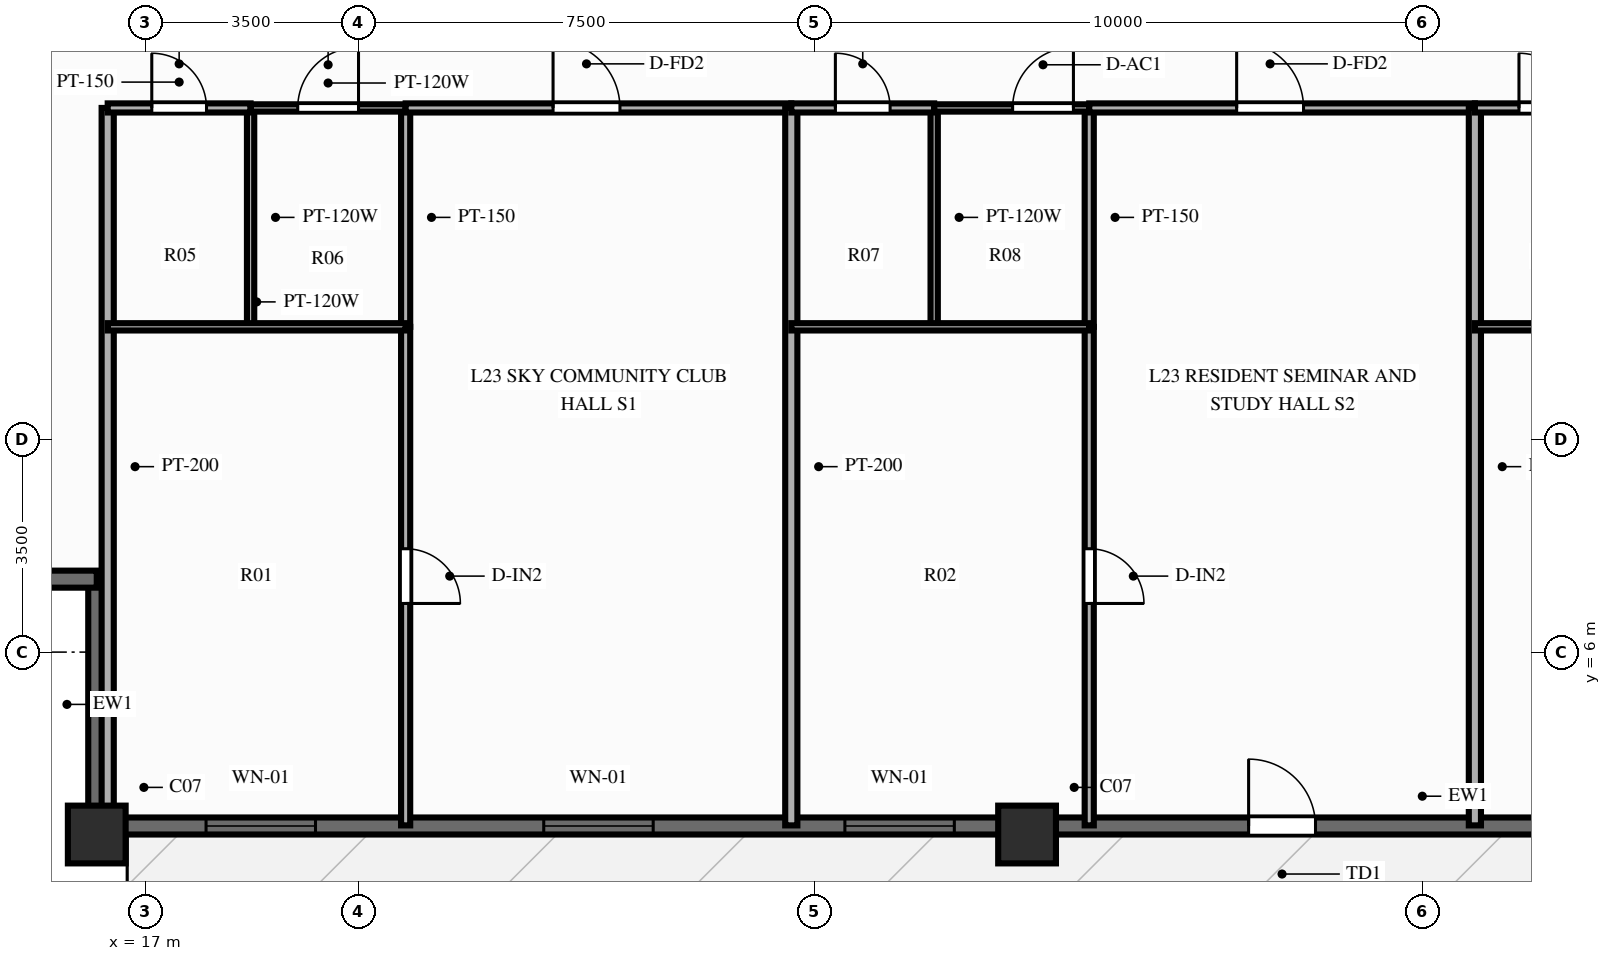
"""IFC4 building model, lengths in metres.
Left out: names, types, materials, properties, quantities, classifications, styles, units other than length and angle.
Written with IfcOpenShell. Run it as: python <this file> out.ifc"""

import sys

from ifc_helpers import new_model, si_unit, direction, frame, frame_2d, origin, origin_2d, place, context, subcontext, project, spatial, rectangle, extrude, source, transform, mapped, element, fill, save


model = new_model("IFC4")
c1 = context("Model", 3, precision=1e-05, world=origin(), true_north=direction((0.0, 1.0)))
c2 = subcontext(c1, "Body", "Model", "MODEL_VIEW")
j1 = project(units=[si_unit("LENGTHUNIT", "METRE"), si_unit("PLANEANGLEUNIT", "RADIAN")], contexts=[c1])
p1 = place(None, origin())
s1 = spatial("IfcSite", under=j1, at=p1, CompositionType="ELEMENT")
p2 = place(p1, origin())
s2 = spatial("IfcBuilding", under=s1, at=p2, CompositionType="ELEMENT")
p3 = place(p2, frame((0.0, 0.0, 74.35)))
s3 = spatial("IfcBuildingStorey", under=s2, at=p3, CompositionType="ELEMENT", Elevation=74.35)
m1 = source(origin(), c2, "Body", "SweptSolid", [
    extrude(rectangle(XDim=0.95, YDim=0.95, at=origin_2d()), origin(), (0.0, 0.0, 1.0), 3.5),
])
for number, where, z_axis, x_axis in (
    (1, (16.2, 3.0, 0.0), (0.0, 0.0, 1.0), (1.0, 0.0, 0.0)),
    (2, (31.5, 3.0, 0.0), (0.0, 0.0, 1.0), (1.0, 0.0, 0.0)),
):
    element("IfcColumn", number, at=place(p3, frame(where, z_axis=z_axis, x_axis=x_axis)), inside=s3, PredefinedType="COLUMN", context=c2, shape_type="MappedRepresentation", body=[
        mapped(m1, transform((0.0, 0.0, 0.0), scale=1.0)),
    ])
p4 = place(p3, frame((16.2, 3.14, 0.0), z_axis=(0.0, 0.0, 1.0), x_axis=(1.0, 0.0, 0.0)))
e3 = element("IfcWall", 3, at=p4, inside=s3, PredefinedType="SOLIDWALL", context=c2, shape_type="SweptSolid", body=[
    extrude(rectangle(XDim=43.6, YDim=0.28, at=frame_2d((21.8, 0.0))), origin(), (0.0, 0.0, 1.0), 2.78),
])
p5 = place(p4, frame((1.798, 0.0, 0.85)))
e4 = element("IfcOpeningElement", 4, at=p5, cuts=e3, PredefinedType="OPENING", context=c2, shape_type="SweptSolid", body=[
    extrude(rectangle(XDim=1.8, YDim=1.65, at=frame_2d((0.9, 0.825))), frame((0.0, 0.152, 0.0), z_axis=(0.0, -1.0, 0.0), x_axis=(1.0, 0.0, 0.0)), (0.0, 0.0, 1.0), 0.304),
])
p6 = place(p4, frame((7.351, 0.0, 0.85)))
e5 = element("IfcOpeningElement", 5, at=p6, cuts=e3, PredefinedType="OPENING", context=c2, shape_type="SweptSolid", body=[
    extrude(rectangle(XDim=1.8, YDim=1.65, at=frame_2d((0.9, 0.825))), frame((0.0, 0.152, 0.0), z_axis=(0.0, -1.0, 0.0), x_axis=(1.0, 0.0, 0.0)), (0.0, 0.0, 1.0), 0.304),
])
p7 = place(p4, frame((12.304, 0.0, 0.85)))
e6 = element("IfcOpeningElement", 6, at=p7, cuts=e3, PredefinedType="OPENING", context=c2, shape_type="SweptSolid", body=[
    extrude(rectangle(XDim=1.8, YDim=1.65, at=frame_2d((0.9, 0.825))), frame((0.0, 0.152, 0.0), z_axis=(0.0, -1.0, 0.0), x_axis=(1.0, 0.0, 0.0)), (0.0, 0.0, 1.0), 0.304),
])
p8 = place(p4, frame((20.044, 0.0, 0.0), z_axis=(0.0, 0.0, 1.0), x_axis=(-1.0, 0.0, 0.0)))
e7 = element("IfcOpeningElement", 7, at=p8, cuts=e3, PredefinedType="OPENING", context=c2, shape_type="SweptSolid", body=[
    extrude(rectangle(XDim=1.1, YDim=2.15, at=frame_2d((0.55, 1.075))), frame((0.0, 0.152, 0.0), z_axis=(0.0, -1.0, 0.0), x_axis=(1.0, 0.0, 0.0)), (0.0, 0.0, 1.0), 0.304),
])
p9 = place(p4, frame((24.215, 0.0, 0.85)))
e8 = element("IfcOpeningElement", 8, at=p9, cuts=e3, PredefinedType="OPENING", context=c2, shape_type="SweptSolid", body=[
    extrude(rectangle(XDim=1.8, YDim=1.65, at=frame_2d((0.9, 0.825))), frame((0.0, 0.152, 0.0), z_axis=(0.0, -1.0, 0.0), x_axis=(1.0, 0.0, 0.0)), (0.0, 0.0, 1.0), 0.304),
])
p10 = place(p4, frame((29.929, 0.0, 0.85)))
e9 = element("IfcOpeningElement", 9, at=p10, cuts=e3, PredefinedType="OPENING", context=c2, shape_type="SweptSolid", body=[
    extrude(rectangle(XDim=1.8, YDim=1.65, at=frame_2d((0.9, 0.825))), frame((0.0, 0.152, 0.0), z_axis=(0.0, -1.0, 0.0), x_axis=(1.0, 0.0, 0.0)), (0.0, 0.0, 1.0), 0.304),
])
p11 = place(p4, frame((34.592, 0.0, 0.85)))
e10 = element("IfcOpeningElement", 10, at=p11, cuts=e3, PredefinedType="OPENING", context=c2, shape_type="SweptSolid", body=[
    extrude(rectangle(XDim=1.8, YDim=1.65, at=frame_2d((0.9, 0.825))), frame((0.0, 0.152, 0.0), z_axis=(0.0, -1.0, 0.0), x_axis=(1.0, 0.0, 0.0)), (0.0, 0.0, 1.0), 0.304),
])
p12 = place(p4, frame((39.714, 0.0, 0.85)))
e11 = element("IfcOpeningElement", 11, at=p12, cuts=e3, PredefinedType="OPENING", context=c2, shape_type="SweptSolid", body=[
    extrude(rectangle(XDim=1.8, YDim=1.65, at=frame_2d((0.9, 0.825))), frame((0.0, 0.152, 0.0), z_axis=(0.0, -1.0, 0.0), x_axis=(1.0, 0.0, 0.0)), (0.0, 0.0, 1.0), 0.304),
])
for number, where, z_axis, x_axis in (
    (12, (16.2, 3.08, 0.0), (0.0, 0.0, 1.0), (0.0, 1.0, 0.0)),
    (13, (12.08, 7.2, 0.0), (0.0, 0.0, 1.0), (1.0, 0.0, 0.0)),
):
    element("IfcWall", number, at=place(p3, frame(where, z_axis=z_axis, x_axis=x_axis)), inside=s3, PredefinedType="SOLIDWALL", context=c2, shape_type="SweptSolid", body=[
        extrude(rectangle(XDim=4.12, YDim=0.28, at=frame_2d((2.06, 0.0))), origin(), (0.0, 0.0, 1.0), 2.78),
    ])
p13 = place(p3, frame((16.38, 14.95, 0.0), z_axis=(0.0, 0.0, 1.0), x_axis=(0.0, -1.0, 0.0)))
e14 = element("IfcWall", 14, at=p13, inside=s3, PredefinedType="PARTITIONING", context=c2, shape_type="SweptSolid", body=[
    extrude(rectangle(XDim=11.8, YDim=0.2, at=frame_2d((5.9, 0.0))), origin(), (0.0, 0.0, 1.0), 3.29),
])
p14 = place(p3, frame((18.73, 14.95, 0.0), z_axis=(0.0, 0.0, 1.0), x_axis=(0.0, -1.0, 0.0)))
e15 = element("IfcWall", 15, at=p14, inside=s3, PredefinedType="PARTITIONING", context=c2, shape_type="SweptSolid", body=[
    extrude(rectangle(XDim=3.6, YDim=0.12, at=frame_2d((1.8, 0.0))), origin(), (0.0, 0.0, 1.0), 3.29),
])
p15 = place(p3, frame((21.28, 14.95, 0.0), z_axis=(0.0, 0.0, 1.0), x_axis=(0.0, -1.0, 0.0)))
e16 = element("IfcWall", 16, at=p15, inside=s3, PredefinedType="PARTITIONING", context=c2, shape_type="SweptSolid", body=[
    extrude(rectangle(XDim=3.6, YDim=0.15, at=frame_2d((1.8, 0.0))), origin(), (0.0, 0.0, 1.0), 3.29),
])
p16 = place(p3, frame((21.28, 11.35, 0.0), z_axis=(0.0, 0.0, 1.0), x_axis=(0.0, -1.0, 0.0)))
e17 = element("IfcWall", 17, at=p16, inside=s3, PredefinedType="PARTITIONING", context=c2, shape_type="SweptSolid", body=[
    extrude(rectangle(XDim=8.2, YDim=0.15, at=frame_2d((4.1, 0.0))), origin(), (0.0, 0.0, 1.0), 3.29),
])
p17 = place(p16, frame((3.65, 0.0, 0.0)))
e18 = element("IfcOpeningElement", 18, at=p17, cuts=e17, PredefinedType="OPENING", context=c2, shape_type="SweptSolid", body=[
    extrude(rectangle(XDim=0.9, YDim=2.1, at=frame_2d((0.45, 1.05))), frame((0.0, 0.087, 0.0), z_axis=(0.0, -1.0, 0.0), x_axis=(1.0, 0.0, 0.0)), (0.0, 0.0, 1.0), 0.174),
])
p18 = place(p3, frame((16.38, 11.35, 0.0), z_axis=(0.0, 0.0, 1.0), x_axis=(1.0, 0.0, 0.0)))
e19 = element("IfcWall", 19, at=p18, inside=s3, PredefinedType="PARTITIONING", context=c2, shape_type="SweptSolid", body=[
    extrude(rectangle(XDim=4.9, YDim=0.12, at=frame_2d((2.45, 0.0))), origin(), (0.0, 0.0, 1.0), 3.29),
])
p19 = place(p3, frame((16.38, 14.95, 0.0), z_axis=(0.0, 0.0, 1.0), x_axis=(1.0, 0.0, 0.0)))
e20 = element("IfcWall", 20, at=p19, inside=s3, PredefinedType="PARTITIONING", context=c2, shape_type="SweptSolid", body=[
    extrude(rectangle(XDim=2.35, YDim=0.15, at=frame_2d((1.175, 0.0))), origin(), (0.0, 0.0, 1.0), 3.29),
])
p20 = place(p19, frame((0.725, 0.0, 0.0)))
e21 = element("IfcOpeningElement", 21, at=p20, cuts=e20, PredefinedType="OPENING", context=c2, shape_type="SweptSolid", body=[
    extrude(rectangle(XDim=0.9, YDim=2.1, at=frame_2d((0.45, 1.05))), frame((0.0, 0.087, 0.0), z_axis=(0.0, -1.0, 0.0), x_axis=(1.0, 0.0, 0.0)), (0.0, 0.0, 1.0), 0.174),
])
p21 = place(p3, frame((18.73, 14.95, 0.0), z_axis=(0.0, 0.0, 1.0), x_axis=(1.0, 0.0, 0.0)))
e22 = element("IfcWall", 22, at=p21, inside=s3, PredefinedType="PARTITIONING", context=c2, shape_type="SweptSolid", body=[
    extrude(rectangle(XDim=2.55, YDim=0.12, at=frame_2d((1.275, 0.0))), origin(), (0.0, 0.0, 1.0), 3.29),
])
p22 = place(p21, frame((0.775, 0.0, 0.0)))
e23 = element("IfcOpeningElement", 23, at=p22, cuts=e22, PredefinedType="OPENING", context=c2, shape_type="SweptSolid", body=[
    extrude(rectangle(XDim=1.0, YDim=2.1, at=frame_2d((0.5, 1.05))), frame((0.0, 0.072, 0.0), z_axis=(0.0, -1.0, 0.0), x_axis=(1.0, 0.0, 0.0)), (0.0, 0.0, 1.0), 0.144),
])
p23 = place(p3, frame((21.28, 14.95, 0.0), z_axis=(0.0, 0.0, 1.0), x_axis=(1.0, 0.0, 0.0)))
e24 = element("IfcWall", 24, at=p23, inside=s3, PredefinedType="PARTITIONING", context=c2, shape_type="SweptSolid", body=[
    extrude(rectangle(XDim=6.342, YDim=0.15, at=frame_2d((3.171, 0.0))), origin(), (0.0, 0.0, 1.0), 3.29),
])
p24 = place(p23, frame((2.424, 0.0, 0.0)))
e25 = element("IfcOpeningElement", 25, at=p24, cuts=e24, PredefinedType="OPENING", context=c2, shape_type="SweptSolid", body=[
    extrude(rectangle(XDim=1.1, YDim=2.15, at=frame_2d((0.55, 1.075))), frame((0.0, 0.087, 0.0), z_axis=(0.0, -1.0, 0.0), x_axis=(1.0, 0.0, 0.0)), (0.0, 0.0, 1.0), 0.174),
])
p25 = place(p3, frame((27.622, 14.95, 0.0), z_axis=(0.0, 0.0, 1.0), x_axis=(0.0, -1.0, 0.0)))
e26 = element("IfcWall", 26, at=p25, inside=s3, PredefinedType="PARTITIONING", context=c2, shape_type="SweptSolid", body=[
    extrude(rectangle(XDim=11.8, YDim=0.2, at=frame_2d((5.9, 0.0))), origin(), (0.0, 0.0, 1.0), 3.29),
])
p26 = place(p3, frame((29.972, 14.95, 0.0), z_axis=(0.0, 0.0, 1.0), x_axis=(0.0, -1.0, 0.0)))
e27 = element("IfcWall", 27, at=p26, inside=s3, PredefinedType="PARTITIONING", context=c2, shape_type="SweptSolid", body=[
    extrude(rectangle(XDim=3.6, YDim=0.12, at=frame_2d((1.8, 0.0))), origin(), (0.0, 0.0, 1.0), 3.29),
])
p27 = place(p3, frame((32.522, 14.95, 0.0), z_axis=(0.0, 0.0, 1.0), x_axis=(0.0, -1.0, 0.0)))
e28 = element("IfcWall", 28, at=p27, inside=s3, PredefinedType="PARTITIONING", context=c2, shape_type="SweptSolid", body=[
    extrude(rectangle(XDim=3.6, YDim=0.15, at=frame_2d((1.8, 0.0))), origin(), (0.0, 0.0, 1.0), 3.29),
])
p28 = place(p3, frame((32.522, 11.35, 0.0), z_axis=(0.0, 0.0, 1.0), x_axis=(0.0, -1.0, 0.0)))
e29 = element("IfcWall", 29, at=p28, inside=s3, PredefinedType="PARTITIONING", context=c2, shape_type="SweptSolid", body=[
    extrude(rectangle(XDim=8.2, YDim=0.15, at=frame_2d((4.1, 0.0))), origin(), (0.0, 0.0, 1.0), 3.29),
])
p29 = place(p28, frame((3.65, 0.0, 0.0)))
e30 = element("IfcOpeningElement", 30, at=p29, cuts=e29, PredefinedType="OPENING", context=c2, shape_type="SweptSolid", body=[
    extrude(rectangle(XDim=0.9, YDim=2.1, at=frame_2d((0.45, 1.05))), frame((0.0, 0.087, 0.0), z_axis=(0.0, -1.0, 0.0), x_axis=(1.0, 0.0, 0.0)), (0.0, 0.0, 1.0), 0.174),
])
p30 = place(p3, frame((27.622, 11.35, 0.0), z_axis=(0.0, 0.0, 1.0), x_axis=(1.0, 0.0, 0.0)))
e31 = element("IfcWall", 31, at=p30, inside=s3, PredefinedType="PARTITIONING", context=c2, shape_type="SweptSolid", body=[
    extrude(rectangle(XDim=4.9, YDim=0.12, at=frame_2d((2.45, 0.0))), origin(), (0.0, 0.0, 1.0), 3.29),
])
p31 = place(p3, frame((27.622, 14.95, 0.0), z_axis=(0.0, 0.0, 1.0), x_axis=(1.0, 0.0, 0.0)))
e32 = element("IfcWall", 32, at=p31, inside=s3, PredefinedType="PARTITIONING", context=c2, shape_type="SweptSolid", body=[
    extrude(rectangle(XDim=2.35, YDim=0.15, at=frame_2d((1.175, 0.0))), origin(), (0.0, 0.0, 1.0), 3.29),
])
p32 = place(p31, frame((0.725, 0.0, 0.0)))
e33 = element("IfcOpeningElement", 33, at=p32, cuts=e32, PredefinedType="OPENING", context=c2, shape_type="SweptSolid", body=[
    extrude(rectangle(XDim=0.9, YDim=2.1, at=frame_2d((0.45, 1.05))), frame((0.0, 0.087, 0.0), z_axis=(0.0, -1.0, 0.0), x_axis=(1.0, 0.0, 0.0)), (0.0, 0.0, 1.0), 0.174),
])
p33 = place(p3, frame((29.972, 14.95, 0.0), z_axis=(0.0, 0.0, 1.0), x_axis=(1.0, 0.0, 0.0)))
e34 = element("IfcWall", 34, at=p33, inside=s3, PredefinedType="PARTITIONING", context=c2, shape_type="SweptSolid", body=[
    extrude(rectangle(XDim=2.55, YDim=0.12, at=frame_2d((1.275, 0.0))), origin(), (0.0, 0.0, 1.0), 3.29),
])
p34 = place(p33, frame((1.29, 0.0, 0.0)))
e35 = element("IfcOpeningElement", 35, at=p34, cuts=e34, PredefinedType="OPENING", context=c2, shape_type="SweptSolid", body=[
    extrude(rectangle(XDim=1.0, YDim=2.1, at=frame_2d((0.5, 1.05))), frame((0.0, 0.072, 0.0), z_axis=(0.0, -1.0, 0.0), x_axis=(1.0, 0.0, 0.0)), (0.0, 0.0, 1.0), 0.144),
])
p35 = place(p3, frame((32.522, 14.95, 0.0), z_axis=(0.0, 0.0, 1.0), x_axis=(1.0, 0.0, 0.0)))
e36 = element("IfcWall", 36, at=p35, inside=s3, PredefinedType="PARTITIONING", context=c2, shape_type="SweptSolid", body=[
    extrude(rectangle(XDim=6.342, YDim=0.15, at=frame_2d((3.171, 0.0))), origin(), (0.0, 0.0, 1.0), 3.29),
])
p36 = place(p35, frame((2.424, 0.0, 0.0)))
e37 = element("IfcOpeningElement", 37, at=p36, cuts=e36, PredefinedType="OPENING", context=c2, shape_type="SweptSolid", body=[
    extrude(rectangle(XDim=1.1, YDim=2.15, at=frame_2d((0.55, 1.075))), frame((0.0, 0.087, 0.0), z_axis=(0.0, -1.0, 0.0), x_axis=(1.0, 0.0, 0.0)), (0.0, 0.0, 1.0), 0.174),
])
p37 = place(p3, frame((38.865, 14.95, 0.0), z_axis=(0.0, 0.0, 1.0), x_axis=(0.0, -1.0, 0.0)))
e38 = element("IfcWall", 38, at=p37, inside=s3, PredefinedType="PARTITIONING", context=c2, shape_type="SweptSolid", body=[
    extrude(rectangle(XDim=11.8, YDim=0.2, at=frame_2d((5.9, 0.0))), origin(), (0.0, 0.0, 1.0), 3.29),
])
p38 = place(p3, frame((38.865, 11.35, 0.0), z_axis=(0.0, 0.0, 1.0), x_axis=(1.0, 0.0, 0.0)))
e39 = element("IfcWall", 39, at=p38, inside=s3, PredefinedType="PARTITIONING", context=c2, shape_type="SweptSolid", body=[
    extrude(rectangle(XDim=4.9, YDim=0.12, at=frame_2d((2.45, 0.0))), origin(), (0.0, 0.0, 1.0), 3.29),
])
p39 = place(p3, frame((38.865, 14.95, 0.0), z_axis=(0.0, 0.0, 1.0), x_axis=(1.0, 0.0, 0.0)))
e40 = element("IfcWall", 40, at=p39, inside=s3, PredefinedType="PARTITIONING", context=c2, shape_type="SweptSolid", body=[
    extrude(rectangle(XDim=2.35, YDim=0.15, at=frame_2d((1.175, 0.0))), origin(), (0.0, 0.0, 1.0), 3.29),
])
p40 = place(p39, frame((0.725, 0.0, 0.0)))
e41 = element("IfcOpeningElement", 41, at=p40, cuts=e40, PredefinedType="OPENING", context=c2, shape_type="SweptSolid", body=[
    extrude(rectangle(XDim=0.9, YDim=2.1, at=frame_2d((0.45, 1.05))), frame((0.0, 0.087, 0.0), z_axis=(0.0, -1.0, 0.0), x_axis=(1.0, 0.0, 0.0)), (0.0, 0.0, 1.0), 0.174),
])
m2 = source(origin(), c2, "Body", "SweptSolid", [
    extrude(rectangle(XDim=1.8, YDim=1.65, at=frame_2d((0.9, 0.825))), frame((0.0, 0.03, 0.0), z_axis=(0.0, -1.0, 0.0), x_axis=(1.0, 0.0, 0.0)), (0.0, 0.0, 1.0), 0.06),
])
p41 = place(p5, origin())
e42 = element("IfcWindow", 42, at=p41, inside=s3, PartitioningType="SINGLE_PANEL", PredefinedType="WINDOW", context=c2, shape_type="MappedRepresentation", body=[
    mapped(m2, transform((0.0, 0.0, 0.0), scale=1.0)),
])
fill(e4, e42)
p42 = place(p6, origin())
e43 = element("IfcWindow", 43, at=p42, inside=s3, PartitioningType="SINGLE_PANEL", PredefinedType="WINDOW", context=c2, shape_type="MappedRepresentation", body=[
    mapped(m2, transform((0.0, 0.0, 0.0), scale=1.0)),
])
fill(e5, e43)
p43 = place(p7, origin())
e44 = element("IfcWindow", 44, at=p43, inside=s3, PartitioningType="SINGLE_PANEL", PredefinedType="WINDOW", context=c2, shape_type="MappedRepresentation", body=[
    mapped(m2, transform((0.0, 0.0, 0.0), scale=1.0)),
])
fill(e6, e44)
m3 = source(origin(), c2, "Body", "SweptSolid", [
    extrude(rectangle(XDim=1.1, YDim=2.15, at=frame_2d((0.55, 1.075))), frame((0.0, 0.025, 0.0), z_axis=(0.0, -1.0, 0.0), x_axis=(1.0, 0.0, 0.0)), (0.0, 0.0, 1.0), 0.05),
])
p44 = place(p8, origin())
e45 = element("IfcDoor", 45, at=p44, inside=s3, OperationType="SINGLE_SWING_RIGHT", PredefinedType="DOOR", context=c2, shape_type="MappedRepresentation", body=[
    mapped(m3, transform((0.0, 0.0, 0.0), scale=1.0)),
])
fill(e7, e45)
m4 = source(origin(), c2, "Body", "SweptSolid", [
    extrude(rectangle(XDim=0.9, YDim=2.1, at=frame_2d((0.45, 1.05))), frame((0.0, 0.025, 0.0), z_axis=(0.0, -1.0, 0.0), x_axis=(1.0, 0.0, 0.0)), (0.0, 0.0, 1.0), 0.05),
])
p45 = place(p17, origin())
e46 = element("IfcDoor", 46, at=p45, inside=s3, OperationType="SINGLE_SWING_RIGHT", PredefinedType="DOOR", context=c2, shape_type="MappedRepresentation", body=[
    mapped(m4, transform((0.0, 0.0, 0.0), scale=1.0)),
])
fill(e18, e46)
p46 = place(p20, origin())
e47 = element("IfcDoor", 47, at=p46, inside=s3, OperationType="SINGLE_SWING_LEFT", PredefinedType="DOOR", context=c2, shape_type="MappedRepresentation", body=[
    mapped(m4, transform((0.0, 0.0, 0.0), scale=1.0)),
])
fill(e21, e47)
m5 = source(origin(), c2, "Body", "SweptSolid", [
    extrude(rectangle(XDim=1.0, YDim=2.1, at=frame_2d((0.5, 1.05))), frame((0.0, 0.025, 0.0), z_axis=(0.0, -1.0, 0.0), x_axis=(1.0, 0.0, 0.0)), (0.0, 0.0, 1.0), 0.05),
])
p47 = place(p22, origin())
e48 = element("IfcDoor", 48, at=p47, inside=s3, OperationType="SINGLE_SWING_RIGHT", PredefinedType="DOOR", context=c2, shape_type="MappedRepresentation", body=[
    mapped(m5, transform((0.0, 0.0, 0.0), scale=1.0)),
])
fill(e23, e48)
p48 = place(p24, origin())
e49 = element("IfcDoor", 49, at=p48, inside=s3, OperationType="SINGLE_SWING_LEFT", PredefinedType="DOOR", context=c2, shape_type="MappedRepresentation", body=[
    mapped(m3, transform((0.0, 0.0, 0.0), scale=1.0)),
])
fill(e25, e49)
p49 = place(p29, origin())
e50 = element("IfcDoor", 50, at=p49, inside=s3, OperationType="SINGLE_SWING_RIGHT", PredefinedType="DOOR", context=c2, shape_type="MappedRepresentation", body=[
    mapped(m4, transform((0.0, 0.0, 0.0), scale=1.0)),
])
fill(e30, e50)
p50 = place(p32, origin())
e51 = element("IfcDoor", 51, at=p50, inside=s3, OperationType="SINGLE_SWING_LEFT", PredefinedType="DOOR", context=c2, shape_type="MappedRepresentation", body=[
    mapped(m4, transform((0.0, 0.0, 0.0), scale=1.0)),
])
fill(e33, e51)
p51 = place(p34, origin())
e52 = element("IfcDoor", 52, at=p51, inside=s3, OperationType="SINGLE_SWING_RIGHT", PredefinedType="DOOR", context=c2, shape_type="MappedRepresentation", body=[
    mapped(m5, transform((0.0, 0.0, 0.0), scale=1.0)),
])
fill(e35, e52)
p52 = place(p36, origin())
e53 = element("IfcDoor", 53, at=p52, inside=s3, OperationType="SINGLE_SWING_LEFT", PredefinedType="DOOR", context=c2, shape_type="MappedRepresentation", body=[
    mapped(m3, transform((0.0, 0.0, 0.0), scale=1.0)),
])
fill(e37, e53)
p53 = place(p40, origin())
e54 = element("IfcDoor", 54, at=p53, inside=s3, OperationType="SINGLE_SWING_LEFT", PredefinedType="DOOR", context=c2, shape_type="MappedRepresentation", body=[
    mapped(m4, transform((0.0, 0.0, 0.0), scale=1.0)),
])
fill(e41, e54)
save(model, sys.argv[1])
